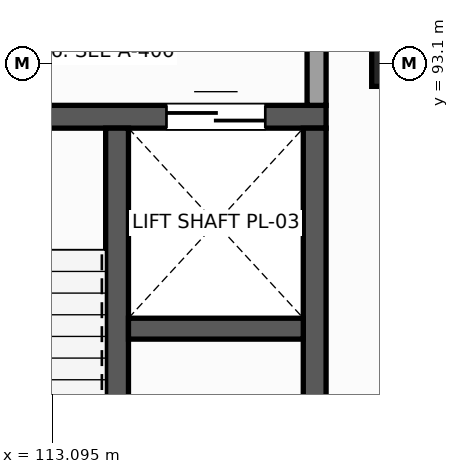
"""IFC4 building model, lengths in metres.
Left out: names, types, materials, properties, quantities, classifications, styles, units other than length and angle.
Written with IfcOpenShell. Run it as: python <this file> out.ifc"""

import sys

from ifc_helpers import new_model, si_unit, direction, frame, frame_2d, origin, origin_2d, place, context, subcontext, project, spatial, rectangle, extrude, element, fill, save


model = new_model("IFC4")
c1 = context("Model", 3, precision=1e-05, world=origin(), true_north=direction((0.0, 1.0)))
c2 = subcontext(c1, "Body", "Model", "MODEL_VIEW")
j1 = project(units=[si_unit("LENGTHUNIT", "METRE"), si_unit("PLANEANGLEUNIT", "RADIAN")], contexts=[c1])
p1 = place(None, origin())
s1 = spatial("IfcSite", under=j1, at=p1, CompositionType="ELEMENT")
p2 = place(p1, origin())
s2 = spatial("IfcBuilding", under=s1, at=p2, CompositionType="ELEMENT")
p3 = place(p2, frame((0.0, 0.0, 10.8)))
s3 = spatial("IfcBuildingStorey", under=s2, at=p3, CompositionType="ELEMENT", Elevation=10.8)
p4 = place(p3, frame((117.6, 93.1, 0.0), z_axis=(0.0, 0.0, 1.0), x_axis=(1.0, 0.0, 0.0)))
e1 = element("IfcColumn", 1, at=p4, inside=s3, PredefinedType="COLUMN", context=c2, shape_type="SweptSolid", body=[
    extrude(rectangle(XDim=0.6, YDim=0.6, at=origin_2d()), origin(), (0.0, 0.0, 1.0), 4.8),
])
p5 = place(p3, frame((110.1, 92.4, 0.0), z_axis=(0.0, 0.0, 1.0), x_axis=(1.0, 0.0, 0.0)))
e2 = element("IfcWall", 2, at=p5, inside=s3, PredefinedType="SHEAR", context=c2, shape_type="SweptSolid", body=[
    extrude(rectangle(XDim=6.6, YDim=0.3, at=frame_2d((3.3, 0.0))), origin(), (0.0, 0.0, 1.0), 4.5),
])
p6 = place(p5, frame((1.425, 0.0, 0.0)))
e3 = element("IfcOpeningElement", 3, at=p6, cuts=e2, PredefinedType="OPENING", context=c2, shape_type="SweptSolid", body=[
    extrude(rectangle(XDim=1.15, YDim=2.2, at=frame_2d((0.575, 1.1))), frame((0.0, 0.16, 0.0), z_axis=(0.0, -1.0, 0.0), x_axis=(1.0, 0.0, 0.0)), (0.0, 0.0, 1.0), 0.32),
])
p7 = place(p5, frame((4.5, 0.0, 0.0)))
e4 = element("IfcOpeningElement", 4, at=p7, cuts=e2, PredefinedType="OPENING", context=c2, shape_type="SweptSolid", body=[
    extrude(rectangle(XDim=1.3, YDim=2.2, at=frame_2d((0.65, 1.1))), frame((0.0, 0.16, 0.0), z_axis=(0.0, -1.0, 0.0), x_axis=(1.0, 0.0, 0.0)), (0.0, 0.0, 1.0), 0.32),
])
for number, where, z_axis, x_axis in (
    (5, (116.55, 84.85, 0.0), (0.0, 0.0, 1.0), (0.0, 1.0, 0.0)),
    (6, (113.95, 84.85, 0.0), (0.0, 0.0, 1.0), (0.0, 1.0, 0.0)),
):
    element("IfcWall", number, at=place(p3, frame(where, z_axis=z_axis, x_axis=x_axis)), inside=s3, PredefinedType="SHEAR", context=c2, shape_type="SweptSolid", body=[
        extrude(rectangle(XDim=7.4, YDim=0.3, at=frame_2d((3.7, 0.0))), origin(), (0.0, 0.0, 1.0), 4.5),
    ])
p8 = place(p3, frame((114.1, 89.612, 0.0), z_axis=(0.0, 0.0, 1.0), x_axis=(1.0, 0.0, 0.0)))
e7 = element("IfcWall", 7, at=p8, inside=s3, PredefinedType="SHEAR", context=c2, shape_type="SweptSolid", body=[
    extrude(rectangle(XDim=2.3, YDim=0.275, at=frame_2d((1.15, 0.0))), origin(), (0.0, 0.0, 1.0), 4.5),
])
p9 = place(p3, frame((116.575, 92.55, 0.0), z_axis=(0.0, 0.0, 1.0), x_axis=(0.0, 1.0, 0.0)))
e8 = element("IfcWall", 8, at=p9, inside=s3, PredefinedType="PARTITIONING", context=c2, shape_type="SweptSolid", body=[
    extrude(rectangle(XDim=2.95, YDim=0.25, at=frame_2d((1.475, 0.0))), origin(), (0.0, 0.0, 1.0), 3.73),
])
p10 = place(p7, origin())
e9 = element("IfcDoor", 9, at=p10, inside=s3, OperationType="DOUBLE_DOOR_SLIDING", PredefinedType="DOOR", context=c2, shape_type="SweptSolid", body=[
    extrude(rectangle(XDim=1.3, YDim=2.2, at=frame_2d((0.65, 1.1))), frame((0.0, 0.025, 0.0), z_axis=(0.0, -1.0, 0.0), x_axis=(1.0, 0.0, 0.0)), (0.0, 0.0, 1.0), 0.05),
])
fill(e4, e9)
save(model, sys.argv[1])
